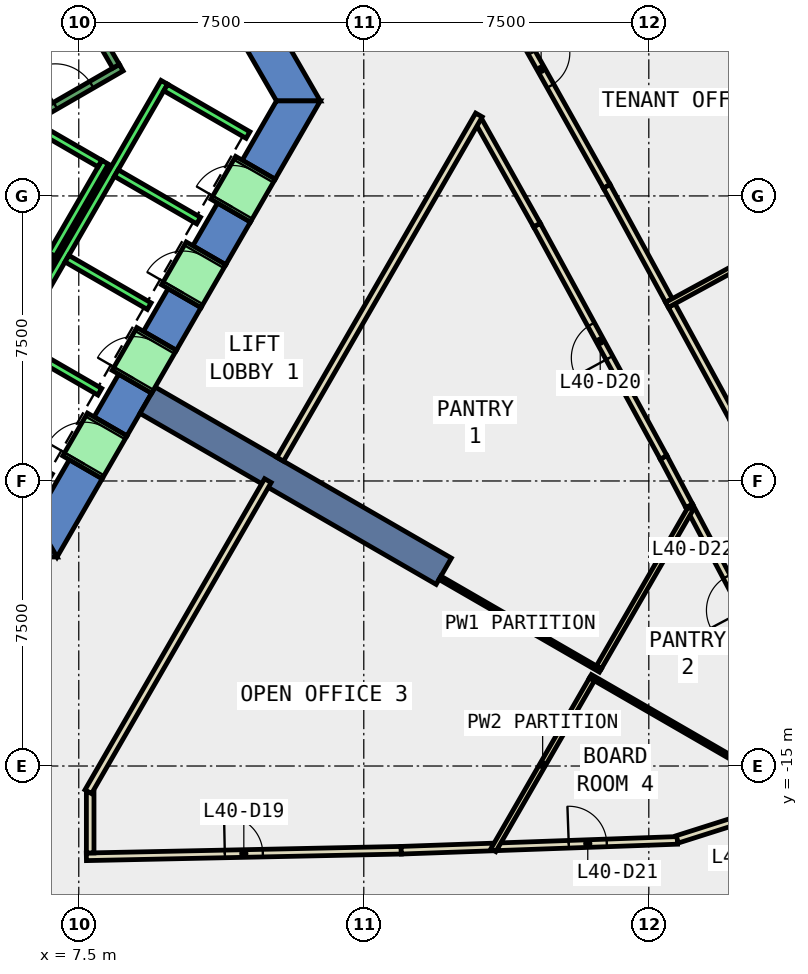
"""IFC4 building model, lengths in metres.
Left out: names, types, materials, properties, quantities, classifications, styles, units other than length and angle.
Written with IfcOpenShell. Run it as: python <this file> out.ifc"""

import sys

from ifc_helpers import new_model, si_unit, direction, frame, frame_2d, origin, place, context, subcontext, project, spatial, polyline, rectangle, outline, extrude, element, fill, save


model = new_model("IFC4")
c1 = context("Model", 3, precision=1e-05, world=origin(), true_north=direction((0.0, 1.0)))
c2 = subcontext(c1, "Body", "Model", "MODEL_VIEW")
j1 = project(units=[si_unit("LENGTHUNIT", "METRE"), si_unit("PLANEANGLEUNIT", "RADIAN")], contexts=[c1])
p1 = place(None, origin())
s1 = spatial("IfcSite", under=j1, at=p1, CompositionType="ELEMENT")
p2 = place(p1, origin())
s2 = spatial("IfcBuilding", under=s1, at=p2, CompositionType="ELEMENT")
p3 = place(p2, frame((0.0, 0.0, 180.2)))
s3 = spatial("IfcBuildingStorey", under=s2, at=p3, CompositionType="ELEMENT", Elevation=180.2)
p4 = place(p3, frame((0.0, 0.0, -0.4)))
e1 = element("IfcWall", 1, at=p4, inside=s3, PredefinedType="SHEAR", context=c2, shape_type="SweptSolid", body=[
    extrude(outline(polyline([(8.517, 11.748), (7.651, 11.248), (12.702, 2.5), (13.856, 2.5), (8.517, 11.748)])), origin(), (0.0, 0.0, 1.0), 4.0),
])
p5 = place(p3, frame((0.0, 0.0, -0.4)))
e2 = element("IfcWall", 2, at=p5, inside=s3, PredefinedType="SHEAR", context=c2, shape_type="SweptSolid", body=[
    extrude(outline(polyline([(5.75, -8.5), (5.75, -9.5), (6.928, -9.5), (6.351, -8.5), (5.75, -8.5)])), origin(), (0.0, 0.0, 1.0), 4.0),
])
p6 = place(p3, frame((0.0, 0.0, -0.4)))
e3 = element("IfcWall", 3, at=p6, inside=s3, PredefinedType="SHEAR", context=c2, shape_type="SweptSolid", body=[
    extrude(outline(polyline([(8.117, -7.44), (7.252, -6.94), (6.351, -8.5), (6.928, -9.5), (8.117, -7.44)])), origin(), (0.0, 0.0, 1.0), 4.0),
])
p7 = place(p3, frame((0.0, 0.0, -0.4)))
e4 = element("IfcWall", 4, at=p7, inside=s3, PredefinedType="SHEAR", context=c2, shape_type="SweptSolid", body=[
    extrude(outline(polyline([(9.417, -5.189), (8.551, -4.689), (7.902, -5.814), (8.767, -6.314), (9.417, -5.189)])), origin(), (0.0, 0.0, 1.0), 4.0),
])
p8 = place(p3, frame((0.0, 0.0, -0.4)))
e5 = element("IfcWall", 5, at=p8, inside=s3, PredefinedType="SHEAR", context=c2, shape_type="SweptSolid", body=[
    extrude(outline(polyline([(10.717, -2.937), (9.851, -2.437), (9.201, -3.563), (10.067, -4.063), (10.717, -2.937)])), origin(), (0.0, 0.0, 1.0), 4.0),
])
p9 = place(p3, frame((0.0, 0.0, -0.4)))
e6 = element("IfcWall", 6, at=p9, inside=s3, PredefinedType="SHEAR", context=c2, shape_type="SweptSolid", body=[
    extrude(outline(polyline([(12.017, -0.686), (11.151, -0.186), (10.501, -1.311), (11.367, -1.811), (12.017, -0.686)])), origin(), (0.0, 0.0, 1.0), 4.0),
])
p10 = place(p3, frame((0.0, 0.0, -0.4)))
e7 = element("IfcWall", 7, at=p10, inside=s3, PredefinedType="SHEAR", context=c2, shape_type="SweptSolid", body=[
    extrude(outline(polyline([(11.801, 0.94), (12.667, 0.44), (13.856, 2.5), (12.702, 2.5), (11.801, 0.94)])), origin(), (0.0, 0.0, 1.0), 4.0),
])
p11 = place(p3, frame((9.31, -5.375, -0.4), z_axis=(0.0, 0.0, 1.0), x_axis=(0.866017533419, -0.500013631625, 0.0)))
e8 = element("IfcWall", 8, at=p11, inside=s3, PredefinedType="SHEAR", context=c2, shape_type="SweptSolid", body=[
    extrude(rectangle(XDim=9.0, YDim=0.8, at=frame_2d((4.5, 0.0))), origin(), (0.0, 0.0, 1.0), 4.0),
])
p12 = place(p3, frame((7.7, -17.389, 0.0), z_axis=(0.0, 0.0, 1.0), x_axis=(0.999782442794, 0.020858261713, 0.0)))
e9 = element("IfcWall", 9, at=p12, inside=s3, PredefinedType="PARTITIONING", context=c2, shape_type="SweptSolid", body=[
    extrude(rectangle(XDim=8.287, YDim=0.2, at=frame_2d((4.144, 0.0))), origin(), (0.0, 0.0, 1.0), 3.6),
])
p13 = place(p12, frame((3.644, 0.0, 0.0)))
e10 = element("IfcOpeningElement", 10, at=p13, cuts=e9, PredefinedType="OPENING", context=c2, shape_type="SweptSolid", body=[
    extrude(rectangle(XDim=1.0, YDim=2.1, at=frame_2d((0.5, 1.05))), frame((0.0, 0.11, 0.0), z_axis=(0.0, -1.0, 0.0), x_axis=(1.0, 0.0, 0.0)), (0.0, 0.0, 1.0), 0.22),
])
p14 = place(p3, frame((15.985, -17.216, 0.0), z_axis=(0.0, 0.0, 1.0), x_axis=(0.999373434249, 0.035394052017, 0.0)))
e11 = element("IfcWall", 11, at=p14, inside=s3, PredefinedType="PARTITIONING", context=c2, shape_type="SweptSolid", body=[
    extrude(rectangle(XDim=2.4, YDim=0.2, at=frame_2d((1.2, 0.0))), origin(), (0.0, 0.0, 1.0), 3.6),
])
p15 = place(p3, frame((23.565, -8.158, 0.0), z_axis=(0.0, 0.0, 1.0), x_axis=(-0.46753134131, 0.883976495668, 0.0)))
e12 = element("IfcWall", 12, at=p15, inside=s3, PredefinedType="PARTITIONING", context=c2, shape_type="SweptSolid", body=[
    extrude(rectangle(XDim=1.448, YDim=0.2, at=frame_2d((0.724, 0.0))), origin(), (0.0, 0.0, 1.0), 3.6),
])
p16 = place(p3, frame((22.888, -6.878, 0.0), z_axis=(0.0, 0.0, 1.0), x_axis=(-0.478665365973, 0.877997418799, 0.0)))
e13 = element("IfcWall", 13, at=p16, inside=s3, PredefinedType="PARTITIONING", context=c2, shape_type="SweptSolid", body=[
    extrude(rectangle(XDim=6.961, YDim=0.2, at=frame_2d((3.48, 0.0))), origin(), (0.0, 0.0, 1.0), 3.6),
])
p17 = place(p16, frame((2.981, 0.0, 0.0)))
e14 = element("IfcOpeningElement", 14, at=p17, cuts=e13, PredefinedType="OPENING", context=c2, shape_type="SweptSolid", body=[
    extrude(rectangle(XDim=1.0, YDim=2.1, at=frame_2d((0.5, 1.05))), frame((0.0, 0.11, 0.0), z_axis=(0.0, -1.0, 0.0), x_axis=(1.0, 0.0, 0.0)), (0.0, 0.0, 1.0), 0.22),
])
p18 = place(p3, frame((19.556, -0.766, 0.0), z_axis=(0.0, 0.0, 1.0), x_axis=(-0.489198731197, 0.872172346154, 0.0)))
e15 = element("IfcWall", 15, at=p18, inside=s3, PredefinedType="PARTITIONING", context=c2, shape_type="SweptSolid", body=[
    extrude(rectangle(XDim=3.121, YDim=0.2, at=frame_2d((1.561, 0.0))), origin(), (0.0, 0.0, 1.0), 3.6),
])
p19 = place(p3, frame((18.534, -17.125, 0.0), z_axis=(0.0, 0.0, 1.0), x_axis=(0.999367128298, 0.035571658351, 0.0)))
e16 = element("IfcWall", 16, at=p19, inside=s3, PredefinedType="PARTITIONING", context=c2, shape_type="SweptSolid", body=[
    extrude(rectangle(XDim=4.722, YDim=0.2, at=frame_2d((2.361, 0.0))), origin(), (0.0, 0.0, 1.0), 3.6),
])
p20 = place(p19, frame((1.861, 0.0, 0.0)))
e17 = element("IfcOpeningElement", 17, at=p20, cuts=e16, PredefinedType="OPENING", context=c2, shape_type="SweptSolid", body=[
    extrude(rectangle(XDim=1.0, YDim=2.1, at=frame_2d((0.5, 1.05))), frame((0.0, 0.11, 0.0), z_axis=(0.0, -1.0, 0.0), x_axis=(1.0, 0.0, 0.0)), (0.0, 0.0, 1.0), 0.22),
])
p21 = place(p3, frame((23.249, -16.93, 0.0), z_axis=(0.0, 0.0, 1.0), x_axis=(0.953158072423, 0.302472625167, 0.0)))
e18 = element("IfcWall", 18, at=p21, inside=s3, PredefinedType="PARTITIONING", context=c2, shape_type="SweptSolid", body=[
    extrude(rectangle(XDim=2.743, YDim=0.2, at=frame_2d((1.372, 0.0))), origin(), (0.0, 0.0, 1.0), 3.6),
])
p22 = place(p3, frame((26.0, -12.762, 0.0), z_axis=(0.0, 0.0, 1.0), x_axis=(-0.467534471159, 0.883974840297, 0.0)))
e19 = element("IfcWall", 19, at=p22, inside=s3, PredefinedType="PARTITIONING", context=c2, shape_type="SweptSolid", body=[
    extrude(rectangle(XDim=5.208, YDim=0.2, at=frame_2d((2.604, 0.0))), origin(), (0.0, 0.0, 1.0), 3.6),
])
p23 = place(p22, frame((2.104, 0.0, 0.0)))
e20 = element("IfcOpeningElement", 20, at=p23, cuts=e19, PredefinedType="OPENING", context=c2, shape_type="SweptSolid", body=[
    extrude(rectangle(XDim=1.0, YDim=2.1, at=frame_2d((0.5, 1.05))), frame((0.0, 0.11, 0.0), z_axis=(0.0, -1.0, 0.0), x_axis=(1.0, 0.0, 0.0)), (0.0, 0.0, 1.0), 0.22),
])
p24 = place(p3, frame((26.94, -17.962, 0.0), z_axis=(0.0, 0.0, 1.0), x_axis=(-0.953197442309, -0.302348533941, 0.0)))
e21 = element("IfcWall", 21, at=p24, inside=s3, PredefinedType="PARTITIONING", context=c2, shape_type="SweptSolid", body=[
    extrude(rectangle(XDim=3.618, YDim=0.2, at=frame_2d((1.809, 0.0))), origin(), (0.0, 0.0, 1.0), 3.6),
])
p25 = place(p24, frame((1.309, 0.0, 0.0)))
e22 = element("IfcOpeningElement", 22, at=p25, cuts=e21, PredefinedType="OPENING", context=c2, shape_type="SweptSolid", body=[
    extrude(rectangle(XDim=1.0, YDim=2.1, at=frame_2d((0.5, 1.05))), frame((0.0, 0.11, 0.0), z_axis=(0.0, -1.0, 0.0), x_axis=(1.0, 0.0, 0.0)), (0.0, 0.0, 1.0), 0.22),
])
p26 = place(p3, frame((23.102, -2.884, 0.0), z_axis=(0.0, 0.0, 1.0), x_axis=(0.478646929322, -0.878007469815, 0.0)))
e23 = element("IfcWall", 23, at=p26, inside=s3, PredefinedType="PARTITIONING", context=c2, shape_type="SweptSolid", body=[
    extrude(rectangle(XDim=3.418, YDim=0.2, at=frame_2d((1.709, 0.0))), origin(), (0.0, 0.0, 1.0), 3.6),
])
p27 = place(p3, frame((17.938, 6.411, 0.0), z_axis=(0.0, 0.0, 1.0), x_axis=(0.48930419744, -0.872113182086, 0.0)))
e24 = element("IfcWall", 24, at=p27, inside=s3, PredefinedType="PARTITIONING", context=c2, shape_type="SweptSolid", body=[
    extrude(rectangle(XDim=7.063, YDim=0.2, at=frame_2d((3.532, 0.0))), origin(), (0.0, 0.0, 1.0), 3.6),
])
p28 = place(p27, frame((3.032, 0.0, 0.0)))
e25 = element("IfcOpeningElement", 25, at=p28, cuts=e24, PredefinedType="OPENING", context=c2, shape_type="SweptSolid", body=[
    extrude(rectangle(XDim=1.0, YDim=2.1, at=frame_2d((0.5, 1.05))), frame((0.0, 0.11, 0.0), z_axis=(0.0, -1.0, 0.0), x_axis=(1.0, 0.0, 0.0)), (0.0, 0.0, 1.0), 0.22),
])
p29 = place(p3, frame((21.394, 0.251, 0.0), z_axis=(0.0, 0.0, 1.0), x_axis=(0.478406883784, -0.878138288397, 0.0)))
e26 = element("IfcWall", 26, at=p29, inside=s3, PredefinedType="PARTITIONING", context=c2, shape_type="SweptSolid", body=[
    extrude(rectangle(XDim=3.42, YDim=0.2, at=frame_2d((1.71, 0.0))), origin(), (0.0, 0.0, 1.0), 3.6),
])
p30 = place(p3, frame((7.8, -15.69, 0.0), z_axis=(0.0, 0.0, 1.0), x_axis=(0.0, -1.0, 0.0)))
e27 = element("IfcWall", 27, at=p30, inside=s3, PredefinedType="PARTITIONING", context=c2, shape_type="SweptSolid", body=[
    extrude(rectangle(XDim=1.597, YDim=0.2, at=frame_2d((0.799, 0.0))), origin(), (0.0, 0.0, 1.0), 3.6),
])
p31 = place(p3, frame((12.476, -7.491, 0.0), z_axis=(0.0, 0.0, 1.0), x_axis=(-0.499989258007, -0.866031605588, 0.0)))
e28 = element("IfcWall", 28, at=p31, inside=s3, PredefinedType="PARTITIONING", context=c2, shape_type="SweptSolid", body=[
    extrude(rectangle(XDim=9.452, YDim=0.2, at=frame_2d((4.726, 0.0))), origin(), (0.0, 0.0, 1.0), 3.6),
])
p32 = place(p3, frame((18.03, 2.13, 0.0), z_axis=(0.0, 0.0, 1.0), x_axis=(-0.499919790729, -0.866071707676, 0.0)))
e29 = element("IfcWall", 29, at=p32, inside=s3, PredefinedType="PARTITIONING", context=c2, shape_type="SweptSolid", body=[
    extrude(rectangle(XDim=10.46, YDim=0.2, at=frame_2d((5.23, 0.0))), origin(), (0.0, 0.0, 1.0), 3.6),
])
p33 = place(p3, frame((17.004, -10.047, 0.0), z_axis=(0.0, 0.0, 1.0), x_axis=(0.865997117979, -0.500048989253, 0.0)))
e30 = element("IfcWall", 30, at=p33, inside=s3, PredefinedType="PARTITIONING", context=c2, shape_type="SweptSolid", body=[
    extrude(rectangle(XDim=4.875, YDim=0.1, at=frame_2d((2.438, 0.0))), origin(), (0.0, 0.0, 1.0), 3.6),
])
p34 = place(p3, frame((21.004, -12.719, 0.0), z_axis=(0.0, 0.0, 1.0), x_axis=(-0.499877157623, -0.866096315249, 0.0)))
e31 = element("IfcWall", 31, at=p34, inside=s3, PredefinedType="PARTITIONING", context=c2, shape_type="SweptSolid", body=[
    extrude(rectangle(XDim=5.191, YDim=0.15, at=frame_2d((2.596, 0.0))), origin(), (0.0, 0.0, 1.0), 3.6),
])
p35 = place(p3, frame((23.6, -8.224, 0.0), z_axis=(0.0, 0.0, 1.0), x_axis=(-0.500120854176, -0.865955617349, 0.0)))
e32 = element("IfcWall", 32, at=p35, inside=s3, PredefinedType="PARTITIONING", context=c2, shape_type="SweptSolid", body=[
    extrude(rectangle(XDim=4.827, YDim=0.15, at=frame_2d((2.414, 0.0))), origin(), (0.0, 0.0, 1.0), 3.6),
])
p36 = place(p3, frame((20.964, -12.638, 0.0), z_axis=(0.0, 0.0, 1.0), x_axis=(0.865981737723, -0.500075624211, 0.0)))
e33 = element("IfcWall", 33, at=p36, inside=s3, PredefinedType="PARTITIONING", context=c2, shape_type="SweptSolid", body=[
    extrude(rectangle(XDim=6.203, YDim=0.1, at=frame_2d((3.102, 0.0))), origin(), (0.0, 0.0, 1.0), 3.6),
])
p37 = place(p3, frame((22.978, -2.866, 0.0), z_axis=(0.0, 0.0, 1.0), x_axis=(0.878049098929, 0.478570558925, 0.0)))
e34 = element("IfcWall", 34, at=p37, inside=s3, PredefinedType="PARTITIONING", context=c2, shape_type="SweptSolid", body=[
    extrude(rectangle(XDim=6.501, YDim=0.15, at=frame_2d((3.25, 0.0))), origin(), (0.0, 0.0, 1.0), 3.6),
])
p38 = place(p3, frame((5.492, -3.788, 0.0), z_axis=(0.0, 0.0, 1.0), x_axis=(0.500011755427, 0.866018616679, 0.0)))
e35 = element("IfcWall", 35, at=p38, inside=s3, PredefinedType="STANDARD", context=c2, shape_type="SweptSolid", body=[
    extrude(rectangle(XDim=2.8, YDim=0.2, at=frame_2d((1.4, 0.0))), origin(), (0.0, 0.0, 1.0), 3.6),
])
p39 = place(p3, frame((4.677, -0.2, 0.0), z_axis=(0.0, 0.0, 1.0), x_axis=(0.865973769406, -0.500089422704, 0.0)))
e36 = element("IfcWall", 36, at=p39, inside=s3, PredefinedType="STANDARD", context=c2, shape_type="SweptSolid", body=[
    extrude(rectangle(XDim=2.399, YDim=0.2, at=frame_2d((1.2, 0.0))), origin(), (0.0, 0.0, 1.0), 3.6),
])
p40 = place(p3, frame((4.451, -6.19, 0.0), z_axis=(0.0, 0.0, 1.0), x_axis=(0.50000090737, 0.866024879913, 0.0)))
e37 = element("IfcWall", 37, at=p40, inside=s3, PredefinedType="STANDARD", context=c2, shape_type="SweptSolid", body=[
    extrude(rectangle(XDim=10.6, YDim=0.2, at=frame_2d((5.3, 0.0))), origin(), (0.0, 0.0, 1.0), 3.6),
])
for number, where, z_axis, x_axis in (
    (38, (4.588, -6.153, 0.0), (0.0, 0.0, 1.0), (0.866, -0.5, 0.0)),
    (39, (5.888, -3.902, 0.0), (0.0, 0.0, 1.0), (0.866, -0.5, 0.0)),
    (40, (7.188, -1.65, 0.0), (0.0, 0.0, 1.0), (0.866, -0.5, 0.0)),
    (41, (8.488, 0.602, 0.0), (0.0, 0.0, 1.0), (0.866, -0.5, 0.0)),
):
    element("IfcWall", number, at=place(p3, frame(where, z_axis=z_axis, x_axis=x_axis)), inside=s3, PredefinedType="STANDARD", context=c2, shape_type="SweptSolid", body=[
        extrude(rectangle(XDim=2.5, YDim=0.2, at=frame_2d((1.25, 0.0))), origin(), (0.0, 0.0, 1.0), 3.6),
    ])
p41 = place(p3, frame((9.788, 2.853, 0.0), z_axis=(0.0, 0.0, 1.0), x_axis=(0.865998541277, -0.500046524342, 0.0)))
e42 = element("IfcWall", 42, at=p41, inside=s3, PredefinedType="STANDARD", context=c2, shape_type="SweptSolid", body=[
    extrude(rectangle(XDim=2.5, YDim=0.2, at=frame_2d((1.25, 0.0))), origin(), (0.0, 0.0, 1.0), 3.6),
])
p42 = place(p3, frame((7.598, -7.14, 0.0), z_axis=(0.0, 0.0, 1.0), x_axis=(0.500362116554, 0.865816234728, 0.0)))
e43 = element("IfcWall", 43, at=p42, inside=s3, PredefinedType="STANDARD", context=c2, shape_type="SweptSolid", body=[
    extrude(rectangle(XDim=1.299, YDim=1.2, at=frame_2d((0.65, 0.0))), origin(), (0.0, 0.0, 1.0), 2.4),
])
p43 = place(p42, frame((0.1, 0.0, 0.0)))
e44 = element("IfcOpeningElement", 44, at=p43, cuts=e43, PredefinedType="OPENING", context=c2, shape_type="SweptSolid", body=[
    extrude(rectangle(XDim=1.1, YDim=2.3, at=frame_2d((0.55, 1.15))), frame((0.0, 0.61, 0.0), z_axis=(0.0, -1.0, 0.0), x_axis=(1.0, 0.0, 0.0)), (0.0, 0.0, 1.0), 1.22),
])
p44 = place(p3, frame((8.898, -4.889, 0.0), z_axis=(0.0, 0.0, 1.0), x_axis=(0.500036693733, 0.866004217611, 0.0)))
e45 = element("IfcWall", 45, at=p44, inside=s3, PredefinedType="STANDARD", context=c2, shape_type="SweptSolid", body=[
    extrude(rectangle(XDim=1.3, YDim=1.2, at=frame_2d((0.65, 0.0))), origin(), (0.0, 0.0, 1.0), 2.4),
])
p45 = place(p44, frame((0.1, 0.0, 0.0)))
e46 = element("IfcOpeningElement", 46, at=p45, cuts=e45, PredefinedType="OPENING", context=c2, shape_type="SweptSolid", body=[
    extrude(rectangle(XDim=1.1, YDim=2.3, at=frame_2d((0.55, 1.15))), frame((0.0, 0.61, 0.0), z_axis=(0.0, -1.0, 0.0), x_axis=(1.0, 0.0, 0.0)), (0.0, 0.0, 1.0), 1.22),
])
p46 = place(p3, frame((10.198, -2.637, 0.0), z_axis=(0.0, 0.0, 1.0), x_axis=(0.49989585183, 0.866085525409, 0.0)))
e47 = element("IfcWall", 47, at=p46, inside=s3, PredefinedType="STANDARD", context=c2, shape_type="SweptSolid", body=[
    extrude(rectangle(XDim=1.3, YDim=1.2, at=frame_2d((0.65, 0.0))), origin(), (0.0, 0.0, 1.0), 2.4),
])
p47 = place(p46, frame((0.1, 0.0, 0.0)))
e48 = element("IfcOpeningElement", 48, at=p47, cuts=e47, PredefinedType="OPENING", context=c2, shape_type="SweptSolid", body=[
    extrude(rectangle(XDim=1.1, YDim=2.3, at=frame_2d((0.55, 1.15))), frame((0.0, 0.61, 0.0), z_axis=(0.0, -1.0, 0.0), x_axis=(1.0, 0.0, 0.0)), (0.0, 0.0, 1.0), 1.22),
])
p48 = place(p3, frame((11.498, -0.385, 0.0), z_axis=(0.0, 0.0, 1.0), x_axis=(0.500221244143, 0.865897630733, 0.0)))
e49 = element("IfcWall", 49, at=p48, inside=s3, PredefinedType="STANDARD", context=c2, shape_type="SweptSolid", body=[
    extrude(rectangle(XDim=1.299, YDim=1.2, at=frame_2d((0.65, 0.0))), origin(), (0.0, 0.0, 1.0), 2.4),
])
p49 = place(p48, frame((0.1, 0.0, 0.0)))
e50 = element("IfcOpeningElement", 50, at=p49, cuts=e49, PredefinedType="OPENING", context=c2, shape_type="SweptSolid", body=[
    extrude(rectangle(XDim=1.1, YDim=2.3, at=frame_2d((0.55, 1.15))), frame((0.0, 0.61, 0.0), z_axis=(0.0, -1.0, 0.0), x_axis=(1.0, 0.0, 0.0)), (0.0, 0.0, 1.0), 1.22),
])
p50 = place(p3, frame((6.792, -1.537, 0.0), z_axis=(0.0, 0.0, 1.0), x_axis=(0.49994636267, 0.866056369097, 0.0)))
e51 = element("IfcWall", 51, at=p50, inside=s3, PredefinedType="STANDARD", context=c2, shape_type="SweptSolid", body=[
    extrude(rectangle(XDim=2.8, YDim=0.2, at=frame_2d((1.4, 0.0))), origin(), (0.0, 0.0, 1.0), 2.3),
])
p51 = place(p3, frame((5.977, 2.052, 0.0), z_axis=(0.0, 0.0, 1.0), x_axis=(0.865973769406, -0.500089422704, 0.0)))
e52 = element("IfcWall", 52, at=p51, inside=s3, PredefinedType="STANDARD", context=c2, shape_type="SweptSolid", body=[
    extrude(rectangle(XDim=2.399, YDim=0.2, at=frame_2d((1.2, 0.0))), origin(), (0.0, 0.0, 1.0), 2.3),
])
p52 = place(p3, frame((4.806, 1.176, 0.0), z_axis=(0.0, 0.0, 1.0), x_axis=(0.866059941101, 0.499940174841, 0.0)))
e53 = element("IfcWall", 53, at=p52, inside=s3, PredefinedType="STANDARD", context=c2, shape_type="SweptSolid", body=[
    extrude(rectangle(XDim=4.4, YDim=0.2, at=frame_2d((2.2, 0.0))), origin(), (0.0, 0.0, 1.0), 3.6),
])
p53 = place(p52, frame((2.4, 0.0, 0.0)))
e54 = element("IfcOpeningElement", 54, at=p53, cuts=e53, PredefinedType="OPENING", context=c2, shape_type="SweptSolid", body=[
    extrude(rectangle(XDim=1.1, YDim=2.2, at=frame_2d((0.55, 1.1))), frame((0.0, 0.11, 0.0), z_axis=(0.0, -1.0, 0.0), x_axis=(1.0, 0.0, 0.0)), (0.0, 0.0, 1.0), 0.22),
])
p54 = place(p3, frame((8.48, 3.412, 0.0), z_axis=(0.0, 0.0, 1.0), x_axis=(-0.499978703459, 0.866037698999, 0.0)))
e55 = element("IfcWall", 55, at=p54, inside=s3, PredefinedType="STANDARD", context=c2, shape_type="SweptSolid", body=[
    extrude(rectangle(XDim=6.9, YDim=0.2, at=frame_2d((3.45, 0.0))), origin(), (0.0, 0.0, 1.0), 3.6),
])
p55 = place(p28, origin())
e56 = element("IfcDoor", 56, at=p55, inside=s3, OperationType="SINGLE_SWING_LEFT", PredefinedType="DOOR", context=c2, shape_type="SweptSolid", body=[
    extrude(rectangle(XDim=1.0, YDim=2.1, at=frame_2d((0.5, 1.05))), frame((0.0, 0.025, 0.0), z_axis=(0.0, -1.0, 0.0), x_axis=(1.0, 0.0, 0.0)), (0.0, 0.0, 1.0), 0.05),
])
fill(e25, e56)
p56 = place(p13, origin())
e57 = element("IfcDoor", 57, at=p56, inside=s3, OperationType="SINGLE_SWING_RIGHT", PredefinedType="DOOR", context=c2, shape_type="SweptSolid", body=[
    extrude(rectangle(XDim=1.0, YDim=2.1, at=frame_2d((0.5, 1.05))), frame((0.0, 0.025, 0.0), z_axis=(0.0, -1.0, 0.0), x_axis=(1.0, 0.0, 0.0)), (0.0, 0.0, 1.0), 0.05),
])
fill(e10, e57)
p57 = place(p17, origin())
e58 = element("IfcDoor", 58, at=p57, inside=s3, OperationType="SINGLE_SWING_LEFT", PredefinedType="DOOR", context=c2, shape_type="SweptSolid", body=[
    extrude(rectangle(XDim=1.0, YDim=2.1, at=frame_2d((0.5, 1.05))), frame((0.0, 0.025, 0.0), z_axis=(0.0, -1.0, 0.0), x_axis=(1.0, 0.0, 0.0)), (0.0, 0.0, 1.0), 0.05),
])
fill(e14, e58)
p58 = place(p20, origin())
e59 = element("IfcDoor", 59, at=p58, inside=s3, OperationType="SINGLE_SWING_LEFT", PredefinedType="DOOR", context=c2, shape_type="SweptSolid", body=[
    extrude(rectangle(XDim=1.0, YDim=2.1, at=frame_2d((0.5, 1.05))), frame((0.0, 0.025, 0.0), z_axis=(0.0, -1.0, 0.0), x_axis=(1.0, 0.0, 0.0)), (0.0, 0.0, 1.0), 0.05),
])
fill(e17, e59)
p59 = place(p23, origin())
e60 = element("IfcDoor", 60, at=p59, inside=s3, OperationType="SINGLE_SWING_LEFT", PredefinedType="DOOR", context=c2, shape_type="SweptSolid", body=[
    extrude(rectangle(XDim=1.0, YDim=2.1, at=frame_2d((0.5, 1.05))), frame((0.0, 0.025, 0.0), z_axis=(0.0, -1.0, 0.0), x_axis=(1.0, 0.0, 0.0)), (0.0, 0.0, 1.0), 0.05),
])
fill(e20, e60)
p60 = place(p43, origin())
e61 = element("IfcDoor", 61, at=p60, inside=s3, OperationType="SLIDING_TO_LEFT", PredefinedType="DOOR", context=c2, shape_type="SweptSolid", body=[
    extrude(rectangle(XDim=1.1, YDim=2.3, at=frame_2d((0.55, 1.15))), frame((0.0, 0.025, 0.0), z_axis=(0.0, -1.0, 0.0), x_axis=(1.0, 0.0, 0.0)), (0.0, 0.0, 1.0), 0.05),
])
fill(e44, e61)
p61 = place(p45, origin())
e62 = element("IfcDoor", 62, at=p61, inside=s3, OperationType="SLIDING_TO_LEFT", PredefinedType="DOOR", context=c2, shape_type="SweptSolid", body=[
    extrude(rectangle(XDim=1.1, YDim=2.3, at=frame_2d((0.55, 1.15))), frame((0.0, 0.025, 0.0), z_axis=(0.0, -1.0, 0.0), x_axis=(1.0, 0.0, 0.0)), (0.0, 0.0, 1.0), 0.05),
])
fill(e46, e62)
p62 = place(p47, origin())
e63 = element("IfcDoor", 63, at=p62, inside=s3, OperationType="SLIDING_TO_LEFT", PredefinedType="DOOR", context=c2, shape_type="SweptSolid", body=[
    extrude(rectangle(XDim=1.1, YDim=2.3, at=frame_2d((0.55, 1.15))), frame((0.0, 0.025, 0.0), z_axis=(0.0, -1.0, 0.0), x_axis=(1.0, 0.0, 0.0)), (0.0, 0.0, 1.0), 0.05),
])
fill(e48, e63)
p63 = place(p49, origin())
e64 = element("IfcDoor", 64, at=p63, inside=s3, OperationType="SLIDING_TO_LEFT", PredefinedType="DOOR", context=c2, shape_type="SweptSolid", body=[
    extrude(rectangle(XDim=1.1, YDim=2.3, at=frame_2d((0.55, 1.15))), frame((0.0, 0.025, 0.0), z_axis=(0.0, -1.0, 0.0), x_axis=(1.0, 0.0, 0.0)), (0.0, 0.0, 1.0), 0.05),
])
fill(e50, e64)
p64 = place(p53, origin())
e65 = element("IfcDoor", 65, at=p64, inside=s3, OperationType="SINGLE_SWING_LEFT", PredefinedType="DOOR", context=c2, shape_type="SweptSolid", body=[
    extrude(rectangle(XDim=1.1, YDim=2.2, at=frame_2d((0.55, 1.1))), frame((0.0, 0.025, 0.0), z_axis=(0.0, -1.0, 0.0), x_axis=(1.0, 0.0, 0.0)), (0.0, 0.0, 1.0), 0.05),
])
fill(e54, e65)
save(model, sys.argv[1])
